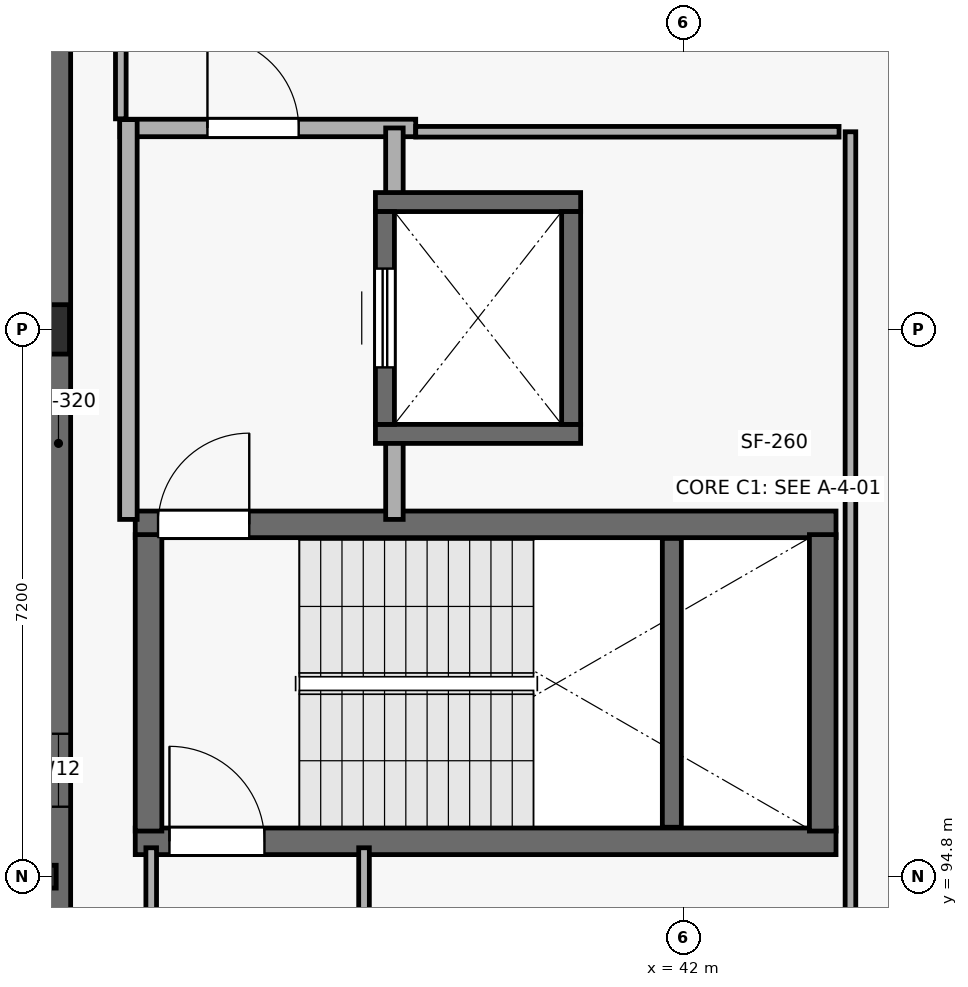
"""IFC4 building model, lengths in metres.
Left out: names, types, materials, properties, quantities, classifications, styles, units other than length and angle.
Written with IfcOpenShell. Run it as: python <this file> out.ifc"""

import sys

from ifc_helpers import new_model, si_unit, direction, frame, frame_2d, origin, origin_2d, place, context, subcontext, project, spatial, rectangle, hollow_rectangle, extrude, element, fill, save


model = new_model("IFC4")
c1 = context("Model", 3, precision=1e-05, world=origin(), true_north=direction((0.0, 1.0)))
c2 = subcontext(c1, "Body", "Model", "MODEL_VIEW")
j1 = project(units=[si_unit("LENGTHUNIT", "METRE"), si_unit("PLANEANGLEUNIT", "RADIAN")], contexts=[c1])
p1 = place(None, origin())
s1 = spatial("IfcSite", under=j1, at=p1, CompositionType="ELEMENT")
p2 = place(p1, origin())
s2 = spatial("IfcBuilding", under=s1, at=p2, CompositionType="ELEMENT")
p3 = place(p2, frame((0.0, 0.0, 40.2)))
s3 = spatial("IfcBuildingStorey", under=s2, at=p3, CompositionType="ELEMENT", Elevation=40.2)
p4 = place(p3, frame((33.6, 94.8, 0.0), z_axis=(0.0, 0.0, 1.0), x_axis=(1.0, 0.0, 0.0)))
e1 = element("IfcColumn", 1, at=p4, inside=s3, PredefinedType="COLUMN", context=c2, shape_type="SweptSolid", body=[
    extrude(hollow_rectangle(XDim=0.3, YDim=0.3, WallThickness=0.012, at=origin_2d()), origin(), (0.0, 0.0, 1.0), 4.5),
])
p5 = place(p3, frame((33.6, 102.0, 0.0), z_axis=(0.0, 0.0, 1.0), x_axis=(1.0, 0.0, 0.0)))
e2 = element("IfcColumn", 2, at=p5, inside=s3, PredefinedType="COLUMN", context=c2, shape_type="SweptSolid", body=[
    extrude(rectangle(XDim=0.65, YDim=0.65, at=origin_2d()), origin(), (0.0, 0.0, 1.0), 4.5),
])
p6 = place(p3, frame((33.78, 90.6, 0.0), z_axis=(0.0, 0.0, 1.0), x_axis=(0.0, 1.0, 0.0)))
e3 = element("IfcWall", 3, at=p6, inside=s3, PredefinedType="SOLIDWALL", context=c2, shape_type="SweptSolid", body=[
    extrude(rectangle(XDim=19.8, YDim=0.32, at=frame_2d((9.9, 0.0))), origin(), (0.0, 0.0, 1.0), 4.24),
])
p7 = place(p6, frame((5.12, 0.0, 0.75)))
e4 = element("IfcOpeningElement", 4, at=p7, cuts=e3, PredefinedType="OPENING", context=c2, shape_type="SweptSolid", body=[
    extrude(rectangle(XDim=0.96, YDim=2.25, at=frame_2d((0.48, 1.125))), frame((0.0, 0.17, 0.0), z_axis=(0.0, -1.0, 0.0), x_axis=(1.0, 0.0, 0.0)), (0.0, 0.0, 1.0), 0.34),
])
p8 = place(p6, frame((15.12, 0.0, 0.75)))
e5 = element("IfcOpeningElement", 5, at=p8, cuts=e3, PredefinedType="OPENING", context=c2, shape_type="SweptSolid", body=[
    extrude(rectangle(XDim=1.12, YDim=1.85, at=frame_2d((0.56, 0.925))), frame((0.0, 0.17, 0.0), z_axis=(0.0, -1.0, 0.0), x_axis=(1.0, 0.0, 0.0)), (0.0, 0.0, 1.0), 0.34),
])
p9 = place(p3, frame((34.79, 95.265, 0.0), z_axis=(0.0, 0.0, 1.0), x_axis=(1.0, 0.0, 0.0)))
e6 = element("IfcWall", 6, at=p9, inside=s3, PredefinedType="SHEAR", context=c2, shape_type="SweptSolid", body=[
    extrude(rectangle(XDim=9.22, YDim=0.35, at=frame_2d((4.61, 0.0))), origin(), (0.0, 0.0, 1.0), 4.24),
])
p10 = place(p9, frame((0.45, 0.0, 0.0)))
e7 = element("IfcOpeningElement", 7, at=p10, cuts=e6, PredefinedType="OPENING", context=c2, shape_type="SweptSolid", body=[
    extrude(rectangle(XDim=1.25, YDim=2.2, at=frame_2d((0.625, 1.1))), frame((0.0, 0.185, 0.0), z_axis=(0.0, -1.0, 0.0), x_axis=(1.0, 0.0, 0.0)), (0.0, 0.0, 1.0), 0.37),
])
p11 = place(p3, frame((44.01, 99.435, 0.0), z_axis=(0.0, 0.0, 1.0), x_axis=(-1.0, 0.0, 0.0)))
e8 = element("IfcWall", 8, at=p11, inside=s3, PredefinedType="SHEAR", context=c2, shape_type="SweptSolid", body=[
    extrude(rectangle(XDim=9.22, YDim=0.35, at=frame_2d((4.61, 0.0))), origin(), (0.0, 0.0, 1.0), 4.24),
])
p12 = place(p11, frame((7.72, 0.0, 0.0)))
e9 = element("IfcOpeningElement", 9, at=p12, cuts=e8, PredefinedType="OPENING", context=c2, shape_type="SweptSolid", body=[
    extrude(rectangle(XDim=1.2, YDim=2.2, at=frame_2d((0.6, 1.1))), frame((0.0, 0.185, 0.0), z_axis=(0.0, -1.0, 0.0), x_axis=(1.0, 0.0, 0.0)), (0.0, 0.0, 1.0), 0.37),
])
for number, where, z_axis, x_axis in (
    (10, (34.965, 95.4, 0.0), (0.0, 0.0, 1.0), (0.0, 1.0, 0.0)),
    (11, (43.835, 99.3, 0.0), (0.0, 0.0, 1.0), (0.0, -1.0, 0.0)),
):
    element("IfcWall", number, at=place(p3, frame(where, z_axis=z_axis, x_axis=x_axis)), inside=s3, PredefinedType="SHEAR", context=c2, shape_type="SweptSolid", body=[
        extrude(rectangle(XDim=3.9, YDim=0.35, at=frame_2d((1.95, 0.0))), origin(), (0.0, 0.0, 1.0), 4.24),
    ])
p13 = place(p3, frame((41.85, 95.45, 0.0), z_axis=(0.0, 0.0, 1.0), x_axis=(0.0, 1.0, 0.0)))
e12 = element("IfcWall", 12, at=p13, inside=s3, PredefinedType="SHEAR", context=c2, shape_type="SweptSolid", body=[
    extrude(rectangle(XDim=3.8, YDim=0.25, at=frame_2d((1.9, 0.0))), origin(), (0.0, 0.0, 1.0), 2.07),
])
p14 = place(p3, frame((34.59, 104.65, 0.0), z_axis=(0.0, 0.0, 1.0), x_axis=(1.0, 0.0, 0.0)))
e13 = element("IfcWall", 13, at=p14, inside=s3, PredefinedType="PARTITIONING", context=c2, shape_type="SweptSolid", body=[
    extrude(rectangle(XDim=3.89, YDim=0.23, at=frame_2d((1.945, 0.0))), origin(), (0.0, 0.0, 1.0), 4.24),
])
p15 = place(p14, frame((1.15, 0.0, 0.0)))
e14 = element("IfcOpeningElement", 14, at=p15, cuts=e13, PredefinedType="OPENING", context=c2, shape_type="SweptSolid", body=[
    extrude(rectangle(XDim=1.2, YDim=2.2, at=frame_2d((0.6, 1.1))), frame((0.0, 0.125, 0.0), z_axis=(0.0, -1.0, 0.0), x_axis=(1.0, 0.0, 0.0)), (0.0, 0.0, 1.0), 0.25),
])
p16 = place(p3, frame((34.7, 99.5, 0.0), z_axis=(0.0, 0.0, 1.0), x_axis=(0.0, 1.0, 0.0)))
e15 = element("IfcWall", 15, at=p16, inside=s3, PredefinedType="PARTITIONING", context=c2, shape_type="SweptSolid", body=[
    extrude(rectangle(XDim=5.26, YDim=0.23, at=frame_2d((2.63, 0.0))), origin(), (0.0, 0.0, 1.0), 4.24),
])
p17 = place(p3, frame((38.2, 104.65, 0.0), z_axis=(0.0, 0.0, 1.0), x_axis=(0.0, -1.0, 0.0)))
e16 = element("IfcWall", 16, at=p17, inside=s3, PredefinedType="PARTITIONING", context=c2, shape_type="SweptSolid", body=[
    extrude(rectangle(XDim=1.1, YDim=0.23, at=frame_2d((0.55, 0.0))), origin(), (0.0, 0.0, 1.0), 4.24),
])
p18 = place(p3, frame((38.2, 100.75, 0.0), z_axis=(0.0, 0.0, 1.0), x_axis=(0.0, -1.0, 0.0)))
e17 = element("IfcWall", 17, at=p18, inside=s3, PredefinedType="PARTITIONING", context=c2, shape_type="SweptSolid", body=[
    extrude(rectangle(XDim=1.25, YDim=0.23, at=frame_2d((0.625, 0.0))), origin(), (0.0, 0.0, 1.0), 4.24),
])
for number, where, z_axis, x_axis in (
    (18, (37.95, 100.625, 0.0), (0.0, 0.0, 1.0), (1.0, 0.0, 0.0)),
    (19, (40.65, 103.675, 0.0), (0.0, 0.0, 1.0), (-1.0, 0.0, 0.0)),
):
    element("IfcWall", number, at=place(p3, frame(where, z_axis=z_axis, x_axis=x_axis)), inside=s3, PredefinedType="SHEAR", context=c2, shape_type="SweptSolid", body=[
        extrude(rectangle(XDim=2.7, YDim=0.25, at=frame_2d((1.35, 0.0))), origin(), (0.0, 0.0, 1.0), 4.24),
    ])
p19 = place(p3, frame((38.075, 100.75, 0.0), z_axis=(0.0, 0.0, 1.0), x_axis=(0.0, 1.0, 0.0)))
e20 = element("IfcWall", 20, at=p19, inside=s3, PredefinedType="SHEAR", context=c2, shape_type="SweptSolid", body=[
    extrude(rectangle(XDim=2.8, YDim=0.25, at=frame_2d((1.4, 0.0))), origin(), (0.0, 0.0, 1.0), 4.24),
])
p20 = place(p19, frame((0.75, 0.0, 0.0)))
e21 = element("IfcOpeningElement", 21, at=p20, cuts=e20, PredefinedType="OPENING", context=c2, shape_type="SweptSolid", body=[
    extrude(rectangle(XDim=1.3, YDim=2.25, at=frame_2d((0.65, 1.125))), frame((0.0, 0.135, 0.0), z_axis=(0.0, -1.0, 0.0), x_axis=(1.0, 0.0, 0.0)), (0.0, 0.0, 1.0), 0.27),
])
p21 = place(p3, frame((40.525, 103.55, 0.0), z_axis=(0.0, 0.0, 1.0), x_axis=(0.0, -1.0, 0.0)))
e22 = element("IfcWall", 22, at=p21, inside=s3, PredefinedType="SHEAR", context=c2, shape_type="SweptSolid", body=[
    extrude(rectangle(XDim=2.8, YDim=0.25, at=frame_2d((1.4, 0.0))), origin(), (0.0, 0.0, 1.0), 4.24),
])
p22 = place(p3, frame((44.2, 104.6, 0.0), z_axis=(0.0, 0.0, 1.0), x_axis=(0.0, -1.0, 0.0)))
e23 = element("IfcWall", 23, at=p22, inside=s3, PredefinedType="PARTITIONING", context=c2, shape_type="SweptSolid", body=[
    extrude(rectangle(XDim=10.75, YDim=0.14, at=frame_2d((5.375, 0.0))), origin(), (0.0, 0.0, 1.0), 4.24),
])
p23 = place(p3, frame((38.48, 104.6, 0.0), z_axis=(0.0, 0.0, 1.0), x_axis=(1.0, 0.0, 0.0)))
e24 = element("IfcWall", 24, at=p23, inside=s3, PredefinedType="PARTITIONING", context=c2, shape_type="SweptSolid", body=[
    extrude(rectangle(XDim=5.57, YDim=0.14, at=frame_2d((2.785, 0.0))), origin(), (0.0, 0.0, 1.0), 4.24),
])
p24 = place(p3, frame((34.6, 107.0, 0.0), z_axis=(0.0, 0.0, 1.0), x_axis=(0.0, -1.0, 0.0)))
e25 = element("IfcWall", 25, at=p24, inside=s3, PredefinedType="PARTITIONING", context=c2, shape_type="SweptSolid", body=[
    extrude(rectangle(XDim=2.23, YDim=0.14, at=frame_2d((1.115, 0.0))), origin(), (0.0, 0.0, 1.0), 4.24),
])
p25 = place(p3, frame((37.8, 94.0, 0.0), z_axis=(0.0, 0.0, 1.0), x_axis=(0.0, 1.0, 0.0)))
e26 = element("IfcWall", 26, at=p25, inside=s3, PredefinedType="PARTITIONING", context=c2, shape_type="SweptSolid", body=[
    extrude(rectangle(XDim=1.18, YDim=0.14, at=frame_2d((0.59, 0.0))), origin(), (0.0, 0.0, 1.0), 4.24),
])
p26 = place(p3, frame((35.0, 95.18, 0.0), z_axis=(0.0, 0.0, 1.0), x_axis=(0.0, -1.0, 0.0)))
e27 = element("IfcWall", 27, at=p26, inside=s3, PredefinedType="PARTITIONING", context=c2, shape_type="SweptSolid", body=[
    extrude(rectangle(XDim=1.33, YDim=0.14, at=frame_2d((0.665, 0.0))), origin(), (0.0, 0.0, 1.0), 4.24),
])
p27 = place(p7, origin())
e28 = element("IfcWindow", 28, at=p27, inside=s3, PartitioningType="SINGLE_PANEL", PredefinedType="WINDOW", context=c2, shape_type="SweptSolid", body=[
    extrude(rectangle(XDim=0.96, YDim=2.25, at=frame_2d((0.48, 1.125))), frame((0.0, 0.03, 0.0), z_axis=(0.0, -1.0, 0.0), x_axis=(1.0, 0.0, 0.0)), (0.0, 0.0, 1.0), 0.06),
])
fill(e4, e28)
p28 = place(p10, origin())
e29 = element("IfcDoor", 29, at=p28, inside=s3, OperationType="SINGLE_SWING_LEFT", PredefinedType="DOOR", context=c2, shape_type="SweptSolid", body=[
    extrude(rectangle(XDim=1.25, YDim=2.2, at=frame_2d((0.625, 1.1))), frame((0.0, 0.025, 0.0), z_axis=(0.0, -1.0, 0.0), x_axis=(1.0, 0.0, 0.0)), (0.0, 0.0, 1.0), 0.05),
])
fill(e7, e29)
p29 = place(p12, origin())
e30 = element("IfcDoor", 30, at=p29, inside=s3, OperationType="SINGLE_SWING_RIGHT", PredefinedType="DOOR", context=c2, shape_type="SweptSolid", body=[
    extrude(rectangle(XDim=1.2, YDim=2.2, at=frame_2d((0.6, 1.1))), frame((0.0, 0.025, 0.0), z_axis=(0.0, -1.0, 0.0), x_axis=(1.0, 0.0, 0.0)), (0.0, 0.0, 1.0), 0.05),
])
fill(e9, e30)
p30 = place(p15, origin())
e31 = element("IfcDoor", 31, at=p30, inside=s3, OperationType="SINGLE_SWING_LEFT", PredefinedType="DOOR", context=c2, shape_type="SweptSolid", body=[
    extrude(rectangle(XDim=1.2, YDim=2.2, at=frame_2d((0.6, 1.1))), frame((0.0, 0.025, 0.0), z_axis=(0.0, -1.0, 0.0), x_axis=(1.0, 0.0, 0.0)), (0.0, 0.0, 1.0), 0.05),
])
fill(e14, e31)
p31 = place(p20, origin())
e32 = element("IfcDoor", 32, at=p31, inside=s3, OperationType="SLIDING_TO_RIGHT", PredefinedType="DOOR", context=c2, shape_type="SweptSolid", body=[
    extrude(rectangle(XDim=1.3, YDim=2.25, at=frame_2d((0.65, 1.125))), frame((0.0, 0.025, 0.0), z_axis=(0.0, -1.0, 0.0), x_axis=(1.0, 0.0, 0.0)), (0.0, 0.0, 1.0), 0.05),
])
fill(e21, e32)
save(model, sys.argv[1])
